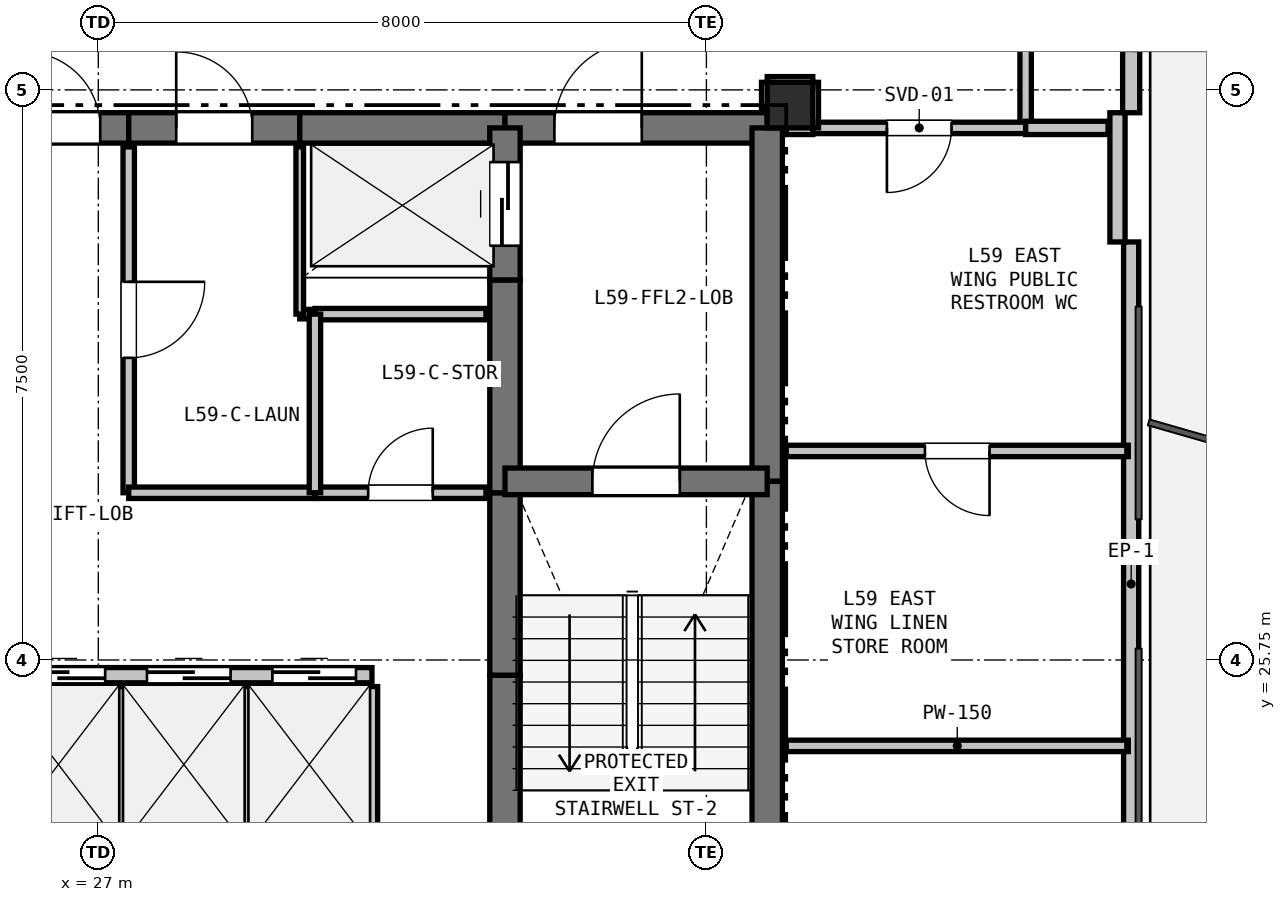
"""IFC4 building model, lengths in metres.
Left out: names, types, materials, properties, quantities, classifications, styles, units other than length and angle.
Written with IfcOpenShell. Run it as: python <this file> out.ifc"""

import sys

from ifc_helpers import new_model, si_unit, direction, frame, frame_2d, origin, origin_2d, place, context, subcontext, project, spatial, rectangle, extrude, element, fill, save


model = new_model("IFC4")
c1 = context("Model", 3, precision=1e-05, world=origin(), true_north=direction((0.0, 1.0)))
c2 = subcontext(c1, "Body", "Model", "MODEL_VIEW")
j1 = project(units=[si_unit("LENGTHUNIT", "METRE"), si_unit("PLANEANGLEUNIT", "RADIAN")], contexts=[c1])
p1 = place(None, origin())
s1 = spatial("IfcSite", under=j1, at=p1, CompositionType="ELEMENT")
p2 = place(p1, origin())
s2 = spatial("IfcBuilding", under=s1, at=p2, CompositionType="ELEMENT")
p3 = place(p2, frame((0.0, 0.0, 211.8)))
s3 = spatial("IfcBuildingStorey", under=s2, at=p3, CompositionType="ELEMENT", Elevation=211.8)
p4 = place(p3, frame((36.1, 33.05, 0.0), z_axis=(0.0, 0.0, 1.0), x_axis=(1.0, 0.0, 0.0)))
e1 = element("IfcColumn", 1, at=p4, inside=s3, PredefinedType="COLUMN", context=c2, shape_type="SweptSolid", body=[
    extrude(rectangle(XDim=0.6, YDim=0.6, at=origin_2d()), origin(), (0.0, 0.0, 1.0), 3.3),
])
p5 = place(p3, frame((40.588, 42.648, 0.0), z_axis=(0.0, 0.0, 1.0), x_axis=(0.0, -1.0, 0.0)))
e2 = element("IfcWall", 2, at=p5, inside=s3, PredefinedType="SOLIDWALL", context=c2, shape_type="SweptSolid", body=[
    extrude(rectangle(XDim=9.699, YDim=0.225, at=frame_2d((4.85, 0.0))), origin(), (0.0, 0.0, 1.0), 2.69),
])
p6 = place(p5, frame((7.784, 0.0, 0.0)))
e3 = element("IfcOpeningElement", 3, at=p6, cuts=e2, PredefinedType="OPENING", context=c2, shape_type="SweptSolid", body=[
    extrude(rectangle(XDim=1.1, YDim=2.1, at=frame_2d((0.55, 1.05))), frame((0.0, 0.123, 0.0), z_axis=(0.0, -1.0, 0.0), x_axis=(1.0, 0.0, 0.0)), (0.0, 0.0, 1.0), 0.245),
])
p7 = place(p3, frame((40.588, 31.25, 0.0), z_axis=(0.0, 0.0, 1.0), x_axis=(0.0, -1.0, 0.0)))
e4 = element("IfcWall", 4, at=p7, inside=s3, PredefinedType="PARAPET", context=c2, shape_type="SweptSolid", body=[
    extrude(rectangle(XDim=8.999, YDim=0.2, at=frame_2d((4.5, 0.0))), origin(), (0.0, 0.0, 1.0), 0.2),
])
p8 = place(p3, frame((40.408, 32.949, 0.0), z_axis=(0.0, 0.0, 1.0), x_axis=(0.0, -1.0, 0.0)))
e5 = element("IfcWall", 5, at=p8, inside=s3, PredefinedType="PARAPET", context=c2, shape_type="SweptSolid", body=[
    extrude(rectangle(XDim=1.7, YDim=0.2, at=frame_2d((0.85, 0.0))), origin(), (0.0, 0.0, 1.0), 2.69),
])
p9 = place(p3, frame((25.65, 32.75, 0.0), z_axis=(0.0, 0.0, 1.0), x_axis=(1.0, 0.0, 0.0)))
e6 = element("IfcWall", 6, at=p9, inside=s3, PredefinedType="SHEAR", context=c2, shape_type="SweptSolid", body=[
    extrude(rectangle(XDim=1.75, YDim=0.4, at=frame_2d((0.875, 0.0))), origin(), (0.0, 0.0, 1.0), 3.07),
])
p10 = place(p9, frame((0.375, 0.0, 0.0)))
e7 = element("IfcOpeningElement", 7, at=p10, cuts=e6, PredefinedType="OPENING", context=c2, shape_type="SweptSolid", body=[
    extrude(rectangle(XDim=1.0, YDim=2.15, at=frame_2d((0.5, 1.075))), frame((0.0, 0.21, 0.0), z_axis=(0.0, -1.0, 0.0), x_axis=(1.0, 0.0, 0.0)), (0.0, 0.0, 1.0), 0.42),
])
p11 = place(p3, frame((27.4, 32.75, 0.0), z_axis=(0.0, 0.0, 1.0), x_axis=(1.0, 0.0, 0.0)))
e8 = element("IfcWall", 8, at=p11, inside=s3, PredefinedType="SHEAR", context=c2, shape_type="SweptSolid", body=[
    extrude(rectangle(XDim=2.25, YDim=0.4, at=frame_2d((1.125, 0.0))), origin(), (0.0, 0.0, 1.0), 3.07),
])
p12 = place(p11, frame((0.625, 0.0, 0.0)))
e9 = element("IfcOpeningElement", 9, at=p12, cuts=e8, PredefinedType="OPENING", context=c2, shape_type="SweptSolid", body=[
    extrude(rectangle(XDim=1.0, YDim=2.15, at=frame_2d((0.5, 1.075))), frame((0.0, 0.21, 0.0), z_axis=(0.0, -1.0, 0.0), x_axis=(1.0, 0.0, 0.0)), (0.0, 0.0, 1.0), 0.42),
])
p13 = place(p3, frame((29.65, 32.75, 0.0), z_axis=(0.0, 0.0, 1.0), x_axis=(1.0, 0.0, 0.0)))
e10 = element("IfcWall", 10, at=p13, inside=s3, PredefinedType="SHEAR", context=c2, shape_type="SweptSolid", body=[
    extrude(rectangle(XDim=2.7, YDim=0.4, at=frame_2d((1.35, 0.0))), origin(), (0.0, 0.0, 1.0), 3.07),
])
p14 = place(p3, frame((32.35, 32.75, 0.0), z_axis=(0.0, 0.0, 1.0), x_axis=(1.0, 0.0, 0.0)))
e11 = element("IfcWall", 11, at=p14, inside=s3, PredefinedType="SHEAR", context=c2, shape_type="SweptSolid", body=[
    extrude(rectangle(XDim=3.45, YDim=0.4, at=frame_2d((1.725, 0.0))), origin(), (0.0, 0.0, 1.0), 3.07),
])
p15 = place(p14, frame((0.65, 0.0, 0.0)))
e12 = element("IfcOpeningElement", 12, at=p15, cuts=e11, PredefinedType="OPENING", context=c2, shape_type="SweptSolid", body=[
    extrude(rectangle(XDim=1.15, YDim=2.15, at=frame_2d((0.575, 1.075))), frame((0.0, 0.21, 0.0), z_axis=(0.0, -1.0, 0.0), x_axis=(1.0, 0.0, 0.0)), (0.0, 0.0, 1.0), 0.42),
])
p16 = place(p3, frame((35.8, 32.75, 0.0), z_axis=(0.0, 0.0, 1.0), x_axis=(0.0, -1.0, 0.0)))
e13 = element("IfcWall", 13, at=p16, inside=s3, PredefinedType="SHEAR", context=c2, shape_type="SweptSolid", body=[
    extrude(rectangle(XDim=4.65, YDim=0.4, at=frame_2d((2.325, 0.0))), origin(), (0.0, 0.0, 1.0), 3.07),
])
p17 = place(p3, frame((35.8, 28.1, 0.0), z_axis=(0.0, 0.0, 1.0), x_axis=(0.0, -1.0, 0.0)))
e14 = element("IfcWall", 14, at=p17, inside=s3, PredefinedType="SHEAR", context=c2, shape_type="SweptSolid", body=[
    extrude(rectangle(XDim=7.35, YDim=0.4, at=frame_2d((3.675, 0.0))), origin(), (0.0, 0.0, 1.0), 3.07),
])
p18 = place(p3, frame((32.35, 20.75, 0.0), z_axis=(0.0, 0.0, 1.0), x_axis=(0.0, 1.0, 0.0)))
e15 = element("IfcWall", 15, at=p18, inside=s3, PredefinedType="SHEAR", context=c2, shape_type="SweptSolid", body=[
    extrude(rectangle(XDim=4.8, YDim=0.4, at=frame_2d((2.4, 0.0))), origin(), (0.0, 0.0, 1.0), 3.07),
])
p19 = place(p3, frame((32.35, 25.55, 0.0), z_axis=(0.0, 0.0, 1.0), x_axis=(0.0, 1.0, 0.0)))
e16 = element("IfcWall", 16, at=p19, inside=s3, PredefinedType="SHEAR", context=c2, shape_type="SweptSolid", body=[
    extrude(rectangle(XDim=2.4, YDim=0.4, at=frame_2d((1.2, 0.0))), origin(), (0.0, 0.0, 1.0), 3.07),
])
p20 = place(p3, frame((32.35, 27.95, 0.0), z_axis=(0.0, 0.0, 1.0), x_axis=(0.0, 1.0, 0.0)))
e17 = element("IfcWall", 17, at=p20, inside=s3, PredefinedType="SHEAR", context=c2, shape_type="SweptSolid", body=[
    extrude(rectangle(XDim=2.8, YDim=0.4, at=frame_2d((1.4, 0.0))), origin(), (0.0, 0.0, 1.0), 3.07),
])
p21 = place(p3, frame((32.35, 30.75, 0.0), z_axis=(0.0, 0.0, 1.0), x_axis=(0.0, 1.0, 0.0)))
e18 = element("IfcWall", 18, at=p21, inside=s3, PredefinedType="SHEAR", context=c2, shape_type="SweptSolid", body=[
    extrude(rectangle(XDim=2.0, YDim=0.4, at=frame_2d((1.0, 0.0))), origin(), (0.0, 0.0, 1.0), 3.07),
])
p22 = place(p21, frame((0.45, 0.0, 0.0)))
e19 = element("IfcOpeningElement", 19, at=p22, cuts=e18, PredefinedType="OPENING", context=c2, shape_type="SweptSolid", body=[
    extrude(rectangle(XDim=1.1, YDim=2.15, at=frame_2d((0.55, 1.075))), frame((0.0, 0.21, 0.0), z_axis=(0.0, -1.0, 0.0), x_axis=(1.0, 0.0, 0.0)), (0.0, 0.0, 1.0), 0.42),
])
p23 = place(p3, frame((32.35, 28.1, 0.0), z_axis=(0.0, 0.0, 1.0), x_axis=(1.0, 0.0, 0.0)))
e20 = element("IfcWall", 20, at=p23, inside=s3, PredefinedType="SHEAR", context=c2, shape_type="SweptSolid", body=[
    extrude(rectangle(XDim=3.45, YDim=0.35, at=frame_2d((1.725, 0.0))), origin(), (0.0, 0.0, 1.0), 3.07),
])
p24 = place(p23, frame((1.15, 0.0, 0.0)))
e21 = element("IfcOpeningElement", 21, at=p24, cuts=e20, PredefinedType="OPENING", context=c2, shape_type="SweptSolid", body=[
    extrude(rectangle(XDim=1.15, YDim=2.15, at=frame_2d((0.575, 1.075))), frame((0.0, 0.185, 0.0), z_axis=(0.0, -1.0, 0.0), x_axis=(1.0, 0.0, 0.0)), (0.0, 0.0, 1.0), 0.37),
])
p25 = place(p3, frame((25.65, 25.55, 0.0), z_axis=(0.0, 0.0, 1.0), x_axis=(1.0, 0.0, 0.0)))
e22 = element("IfcWall", 22, at=p25, inside=s3, PredefinedType="PARTITIONING", context=c2, shape_type="SweptSolid", body=[
    extrude(rectangle(XDim=4.95, YDim=0.2, at=frame_2d((2.475, 0.0))), origin(), (0.0, 0.0, 1.0), 3.07),
])
p26 = place(p25, frame((0.34, 0.0, 0.0)))
e23 = element("IfcOpeningElement", 23, at=p26, cuts=e22, PredefinedType="OPENING", context=c2, shape_type="SweptSolid", body=[
    extrude(rectangle(XDim=1.1, YDim=2.15, at=frame_2d((0.55, 1.075))), frame((0.0, 0.11, 0.0), z_axis=(0.0, -1.0, 0.0), x_axis=(1.0, 0.0, 0.0)), (0.0, 0.0, 1.0), 0.22),
])
p27 = place(p25, frame((1.99, 0.0, 0.0)))
e24 = element("IfcOpeningElement", 24, at=p27, cuts=e22, PredefinedType="OPENING", context=c2, shape_type="SweptSolid", body=[
    extrude(rectangle(XDim=1.1, YDim=2.15, at=frame_2d((0.55, 1.075))), frame((0.0, 0.11, 0.0), z_axis=(0.0, -1.0, 0.0), x_axis=(1.0, 0.0, 0.0)), (0.0, 0.0, 1.0), 0.22),
])
p28 = place(p25, frame((3.64, 0.0, 0.0)))
e25 = element("IfcOpeningElement", 25, at=p28, cuts=e22, PredefinedType="OPENING", context=c2, shape_type="SweptSolid", body=[
    extrude(rectangle(XDim=1.1, YDim=2.15, at=frame_2d((0.55, 1.075))), frame((0.0, 0.11, 0.0), z_axis=(0.0, -1.0, 0.0), x_axis=(1.0, 0.0, 0.0)), (0.0, 0.0, 1.0), 0.22),
])
p29 = place(p3, frame((32.1, 30.3, 0.0), z_axis=(0.0, 0.0, 1.0), x_axis=(-1.0, 0.0, 0.0)))
e26 = element("IfcWall", 26, at=p29, inside=s3, PredefinedType="PARTITIONING", context=c2, shape_type="SweptSolid", body=[
    extrude(rectangle(XDim=2.25, YDim=0.15, at=frame_2d((1.125, 0.0))), origin(), (0.0, 0.0, 1.0), 3.07),
])
p30 = place(p3, frame((29.85, 30.3, 0.0), z_axis=(0.0, 0.0, 1.0), x_axis=(-1.0, 0.0, 0.0)))
e27 = element("IfcWall", 27, at=p30, inside=s3, PredefinedType="PARTITIONING", context=c2, shape_type="SweptSolid", body=[
    extrude(rectangle(XDim=0.2, YDim=0.125, at=frame_2d((0.1, 0.0))), origin(), (0.0, 0.0, 1.0), 3.07),
])
p31 = place(p3, frame((29.65, 30.3, 0.0), z_axis=(0.0, 0.0, 1.0), x_axis=(0.0, 1.0, 0.0)))
e28 = element("IfcWall", 28, at=p31, inside=s3, PredefinedType="PARTITIONING", context=c2, shape_type="SweptSolid", body=[
    extrude(rectangle(XDim=2.2, YDim=0.1, at=frame_2d((1.1, 0.0))), origin(), (0.0, 0.0, 1.0), 3.07),
])
p32 = place(p3, frame((27.3, 25.4, 0.0), z_axis=(0.0, 0.0, 1.0), x_axis=(0.0, -1.0, 0.0)))
e29 = element("IfcWall", 29, at=p32, inside=s3, PredefinedType="PARTITIONING", context=c2, shape_type="SweptSolid", body=[
    extrude(rectangle(XDim=2.2, YDim=0.125, at=frame_2d((1.1, 0.0))), origin(), (0.0, 0.0, 1.0), 3.07),
])
p33 = place(p3, frame((28.95, 25.4, 0.0), z_axis=(0.0, 0.0, 1.0), x_axis=(0.0, -1.0, 0.0)))
e30 = element("IfcWall", 30, at=p33, inside=s3, PredefinedType="PARTITIONING", context=c2, shape_type="SweptSolid", body=[
    extrude(rectangle(XDim=2.2, YDim=0.1, at=frame_2d((1.1, 0.0))), origin(), (0.0, 0.0, 1.0), 3.07),
])
p34 = place(p3, frame((30.6, 25.4, 0.0), z_axis=(0.0, 0.0, 1.0), x_axis=(0.0, -1.0, 0.0)))
e31 = element("IfcWall", 31, at=p34, inside=s3, PredefinedType="PARTITIONING", context=c2, shape_type="SweptSolid", body=[
    extrude(rectangle(XDim=2.2, YDim=0.15, at=frame_2d((1.1, 0.0))), origin(), (0.0, 0.0, 1.0), 3.07),
])
p35 = place(p3, frame((27.4, 32.5, 0.0), z_axis=(0.0, 0.0, 1.0), x_axis=(0.0, -1.0, 0.0)))
e32 = element("IfcWall", 32, at=p35, inside=s3, PredefinedType="PARTITIONING", context=c2, shape_type="SweptSolid", body=[
    extrude(rectangle(XDim=4.55, YDim=0.15, at=frame_2d((2.275, 0.0))), origin(), (0.0, 0.0, 1.0), 3.07),
])
p36 = place(p35, frame((1.775, 0.0, 0.0)))
e33 = element("IfcOpeningElement", 33, at=p36, cuts=e32, PredefinedType="OPENING", context=c2, shape_type="SweptSolid", body=[
    extrude(rectangle(XDim=1.0, YDim=2.15, at=frame_2d((0.5, 1.075))), frame((0.0, 0.085, 0.0), z_axis=(0.0, -1.0, 0.0), x_axis=(1.0, 0.0, 0.0)), (0.0, 0.0, 1.0), 0.17),
])
p37 = place(p3, frame((27.4, 27.95, 0.0), z_axis=(0.0, 0.0, 1.0), x_axis=(1.0, 0.0, 0.0)))
e34 = element("IfcWall", 34, at=p37, inside=s3, PredefinedType="PARTITIONING", context=c2, shape_type="SweptSolid", body=[
    extrude(rectangle(XDim=2.45, YDim=0.15, at=frame_2d((1.225, 0.0))), origin(), (0.0, 0.0, 1.0), 3.07),
])
p38 = place(p3, frame((29.85, 27.95, 0.0), z_axis=(0.0, 0.0, 1.0), x_axis=(1.0, 0.0, 0.0)))
e35 = element("IfcWall", 35, at=p38, inside=s3, PredefinedType="PARTITIONING", context=c2, shape_type="SweptSolid", body=[
    extrude(rectangle(XDim=2.25, YDim=0.15, at=frame_2d((1.125, 0.0))), origin(), (0.0, 0.0, 1.0), 3.07),
])
p39 = place(p38, frame((0.7, 0.0, 0.0)))
e36 = element("IfcOpeningElement", 36, at=p39, cuts=e35, PredefinedType="OPENING", context=c2, shape_type="SweptSolid", body=[
    extrude(rectangle(XDim=0.85, YDim=2.1, at=frame_2d((0.425, 1.05))), frame((0.0, 0.085, 0.0), z_axis=(0.0, -1.0, 0.0), x_axis=(1.0, 0.0, 0.0)), (0.0, 0.0, 1.0), 0.17),
])
p40 = place(p3, frame((39.2, 35.2, 0.0), z_axis=(0.0, 0.0, 1.0), x_axis=(0.0, -1.0, 0.0)))
e37 = element("IfcWall", 37, at=p40, inside=s3, PredefinedType="PARTITIONING", context=c2, shape_type="SweptSolid", body=[
    extrude(rectangle(XDim=2.45, YDim=0.15, at=frame_2d((1.225, 0.0))), origin(), (0.0, 0.0, 1.0), 3.07),
])
p41 = place(p3, frame((39.2, 32.75, 0.0), z_axis=(0.0, 0.0, 1.0), x_axis=(-1.0, 0.0, 0.0)))
e38 = element("IfcWall", 38, at=p41, inside=s3, PredefinedType="PARTITIONING", context=c2, shape_type="SweptSolid", body=[
    extrude(rectangle(XDim=2.8, YDim=0.15, at=frame_2d((1.4, 0.0))), origin(), (0.0, 0.0, 1.0), 3.07),
])
p42 = place(p41, frame((0.975, 0.0, 0.0)))
e39 = element("IfcOpeningElement", 39, at=p42, cuts=e38, PredefinedType="OPENING", context=c2, shape_type="SweptSolid", body=[
    extrude(rectangle(XDim=0.85, YDim=2.1, at=frame_2d((0.425, 1.05))), frame((0.0, 0.085, 0.0), z_axis=(0.0, -1.0, 0.0), x_axis=(1.0, 0.0, 0.0)), (0.0, 0.0, 1.0), 0.17),
])
p43 = place(p3, frame((36.4, 32.75, 0.0), z_axis=(0.0, 0.0, 1.0), x_axis=(0.0, 1.0, 0.0)))
e40 = element("IfcWall", 40, at=p43, inside=s3, PredefinedType="PARTITIONING", context=c2, shape_type="SweptSolid", body=[
    extrude(rectangle(XDim=0.6, YDim=0.15, at=frame_2d((0.3, 0.0))), origin(), (0.0, 0.0, 1.0), 2.518),
])
p44 = place(p3, frame((36.4, 33.35, 0.0), z_axis=(0.0, 0.0, 1.0), x_axis=(-1.0, 0.0, 0.0)))
e41 = element("IfcWall", 41, at=p44, inside=s3, PredefinedType="PARTITIONING", context=c2, shape_type="SweptSolid", body=[
    extrude(rectangle(XDim=0.6, YDim=0.15, at=frame_2d((0.3, 0.0))), origin(), (0.0, 0.0, 1.0), 2.518),
])
p45 = place(p3, frame((35.8, 33.35, 0.0), z_axis=(0.0, 0.0, 1.0), x_axis=(0.0, -1.0, 0.0)))
e42 = element("IfcWall", 42, at=p45, inside=s3, PredefinedType="PARTITIONING", context=c2, shape_type="SweptSolid", body=[
    extrude(rectangle(XDim=0.35, YDim=0.15, at=frame_2d((0.175, 0.0))), origin(), (0.0, 0.0, 1.0), 2.595),
])
p46 = place(p3, frame((36.05, 32.75, 0.0), z_axis=(0.0, 0.0, 1.0), x_axis=(1.0, 0.0, 0.0)))
e43 = element("IfcWall", 43, at=p46, inside=s3, PredefinedType="PLUMBINGWALL", context=c2, shape_type="SweptSolid", body=[
    extrude(rectangle(XDim=0.35, YDim=0.175, at=frame_2d((0.175, 0.0))), origin(), (0.0, 0.0, 1.0), 2.595),
])
p47 = place(p3, frame((39.2, 32.75, 0.0), z_axis=(0.0, 0.0, 1.0), x_axis=(1.0, 0.0, 0.0)))
e44 = element("IfcWall", 44, at=p47, inside=s3, PredefinedType="PLUMBINGWALL", context=c2, shape_type="SweptSolid", body=[
    extrude(rectangle(XDim=1.084, YDim=0.175, at=frame_2d((0.542, 0.0))), origin(), (0.0, 0.0, 1.0), 2.365),
])
p48 = place(p3, frame((40.55, 28.5, 0.0), z_axis=(0.0, 0.0, 1.0), x_axis=(-1.0, 0.0, 0.0)))
e45 = element("IfcWall", 45, at=p48, inside=s3, PredefinedType="PARTITIONING", context=c2, shape_type="SweptSolid", body=[
    extrude(rectangle(XDim=4.5, YDim=0.15, at=frame_2d((2.25, 0.0))), origin(), (0.0, 0.0, 1.0), 2.365),
])
p49 = place(p48, frame((1.825, 0.0, 0.0)))
e46 = element("IfcOpeningElement", 46, at=p49, cuts=e45, PredefinedType="OPENING", context=c2, shape_type="SweptSolid", body=[
    extrude(rectangle(XDim=0.85, YDim=2.1, at=frame_2d((0.425, 1.05))), frame((0.0, 0.085, 0.0), z_axis=(0.0, -1.0, 0.0), x_axis=(1.0, 0.0, 0.0)), (0.0, 0.0, 1.0), 0.17),
])
p50 = place(p3, frame((29.85, 30.3, 0.0), z_axis=(0.0, 0.0, 1.0), x_axis=(0.0, -1.0, 0.0)))
e47 = element("IfcWall", 47, at=p50, inside=s3, PredefinedType="PARTITIONING", context=c2, shape_type="SweptSolid", body=[
    extrude(rectangle(XDim=2.35, YDim=0.15, at=frame_2d((1.175, 0.0))), origin(), (0.0, 0.0, 1.0), 3.07),
])
p51 = place(p3, frame((36.05, 24.62, 0.0), z_axis=(0.0, 0.0, 1.0), x_axis=(1.0, 0.0, 0.0)))
e48 = element("IfcWall", 48, at=p51, inside=s3, PredefinedType="PARTITIONING", context=c2, shape_type="SweptSolid", body=[
    extrude(rectangle(XDim=4.5, YDim=0.15, at=frame_2d((2.25, 0.0))), origin(), (0.0, 0.0, 1.0), 2.365),
])
p52 = place(p26, origin())
e49 = element("IfcDoor", 49, at=p52, inside=s3, OperationType="SLIDING_TO_LEFT", PredefinedType="DOOR", context=c2, shape_type="SweptSolid", body=[
    extrude(rectangle(XDim=1.1, YDim=2.15, at=frame_2d((0.55, 1.075))), frame((0.0, 0.025, 0.0), z_axis=(0.0, -1.0, 0.0), x_axis=(1.0, 0.0, 0.0)), (0.0, 0.0, 1.0), 0.05),
])
fill(e23, e49)
p53 = place(p27, origin())
e50 = element("IfcDoor", 50, at=p53, inside=s3, OperationType="SLIDING_TO_LEFT", PredefinedType="DOOR", context=c2, shape_type="SweptSolid", body=[
    extrude(rectangle(XDim=1.1, YDim=2.15, at=frame_2d((0.55, 1.075))), frame((0.0, 0.025, 0.0), z_axis=(0.0, -1.0, 0.0), x_axis=(1.0, 0.0, 0.0)), (0.0, 0.0, 1.0), 0.05),
])
fill(e24, e50)
p54 = place(p28, origin())
e51 = element("IfcDoor", 51, at=p54, inside=s3, OperationType="SLIDING_TO_LEFT", PredefinedType="DOOR", context=c2, shape_type="SweptSolid", body=[
    extrude(rectangle(XDim=1.1, YDim=2.15, at=frame_2d((0.55, 1.075))), frame((0.0, 0.025, 0.0), z_axis=(0.0, -1.0, 0.0), x_axis=(1.0, 0.0, 0.0)), (0.0, 0.0, 1.0), 0.05),
])
fill(e25, e51)
p55 = place(p10, origin())
e52 = element("IfcDoor", 52, at=p55, inside=s3, OperationType="SINGLE_SWING_LEFT", PredefinedType="DOOR", context=c2, shape_type="SweptSolid", body=[
    extrude(rectangle(XDim=1.0, YDim=2.15, at=frame_2d((0.5, 1.075))), frame((0.0, 0.025, 0.0), z_axis=(0.0, -1.0, 0.0), x_axis=(1.0, 0.0, 0.0)), (0.0, 0.0, 1.0), 0.05),
])
fill(e7, e52)
p56 = place(p22, origin())
e53 = element("IfcDoor", 53, at=p56, inside=s3, OperationType="SLIDING_TO_LEFT", PredefinedType="DOOR", context=c2, shape_type="SweptSolid", body=[
    extrude(rectangle(XDim=1.1, YDim=2.15, at=frame_2d((0.55, 1.075))), frame((0.0, 0.025, 0.0), z_axis=(0.0, -1.0, 0.0), x_axis=(1.0, 0.0, 0.0)), (0.0, 0.0, 1.0), 0.05),
])
fill(e19, e53)
p57 = place(p24, origin())
e54 = element("IfcDoor", 54, at=p57, inside=s3, OperationType="SINGLE_SWING_RIGHT", PredefinedType="DOOR", context=c2, shape_type="SweptSolid", body=[
    extrude(rectangle(XDim=1.15, YDim=2.15, at=frame_2d((0.575, 1.075))), frame((0.0, 0.025, 0.0), z_axis=(0.0, -1.0, 0.0), x_axis=(1.0, 0.0, 0.0)), (0.0, 0.0, 1.0), 0.05),
])
fill(e21, e54)
p58 = place(p15, origin())
e55 = element("IfcDoor", 55, at=p58, inside=s3, OperationType="SINGLE_SWING_RIGHT", PredefinedType="DOOR", context=c2, shape_type="SweptSolid", body=[
    extrude(rectangle(XDim=1.15, YDim=2.15, at=frame_2d((0.575, 1.075))), frame((0.0, 0.025, 0.0), z_axis=(0.0, -1.0, 0.0), x_axis=(1.0, 0.0, 0.0)), (0.0, 0.0, 1.0), 0.05),
])
fill(e12, e55)
p59 = place(p36, origin())
e56 = element("IfcDoor", 56, at=p59, inside=s3, OperationType="SINGLE_SWING_LEFT", PredefinedType="DOOR", context=c2, shape_type="SweptSolid", body=[
    extrude(rectangle(XDim=1.0, YDim=2.15, at=frame_2d((0.5, 1.075))), frame((0.0, 0.025, 0.0), z_axis=(0.0, -1.0, 0.0), x_axis=(1.0, 0.0, 0.0)), (0.0, 0.0, 1.0), 0.05),
])
fill(e33, e56)
p60 = place(p39, origin())
e57 = element("IfcDoor", 57, at=p60, inside=s3, OperationType="SINGLE_SWING_RIGHT", PredefinedType="DOOR", context=c2, shape_type="SweptSolid", body=[
    extrude(rectangle(XDim=0.85, YDim=2.1, at=frame_2d((0.425, 1.05))), frame((0.0, 0.025, 0.0), z_axis=(0.0, -1.0, 0.0), x_axis=(1.0, 0.0, 0.0)), (0.0, 0.0, 1.0), 0.05),
])
fill(e36, e57)
p61 = place(p42, origin())
e58 = element("IfcDoor", 58, at=p61, inside=s3, OperationType="SINGLE_SWING_RIGHT", PredefinedType="DOOR", context=c2, shape_type="SweptSolid", body=[
    extrude(rectangle(XDim=0.85, YDim=2.1, at=frame_2d((0.425, 1.05))), frame((0.0, 0.025, 0.0), z_axis=(0.0, -1.0, 0.0), x_axis=(1.0, 0.0, 0.0)), (0.0, 0.0, 1.0), 0.05),
])
fill(e39, e58)
p62 = place(p12, origin())
e59 = element("IfcDoor", 59, at=p62, inside=s3, OperationType="SINGLE_SWING_LEFT", PredefinedType="DOOR", context=c2, shape_type="SweptSolid", body=[
    extrude(rectangle(XDim=1.0, YDim=2.15, at=frame_2d((0.5, 1.075))), frame((0.0, 0.025, 0.0), z_axis=(0.0, -1.0, 0.0), x_axis=(1.0, 0.0, 0.0)), (0.0, 0.0, 1.0), 0.05),
])
fill(e9, e59)
p63 = place(p49, origin())
e60 = element("IfcDoor", 60, at=p63, inside=s3, OperationType="SINGLE_SWING_LEFT", PredefinedType="DOOR", context=c2, shape_type="SweptSolid", body=[
    extrude(rectangle(XDim=0.85, YDim=2.1, at=frame_2d((0.425, 1.05))), frame((0.0, 0.025, 0.0), z_axis=(0.0, -1.0, 0.0), x_axis=(1.0, 0.0, 0.0)), (0.0, 0.0, 1.0), 0.05),
])
fill(e46, e60)
save(model, sys.argv[1])
